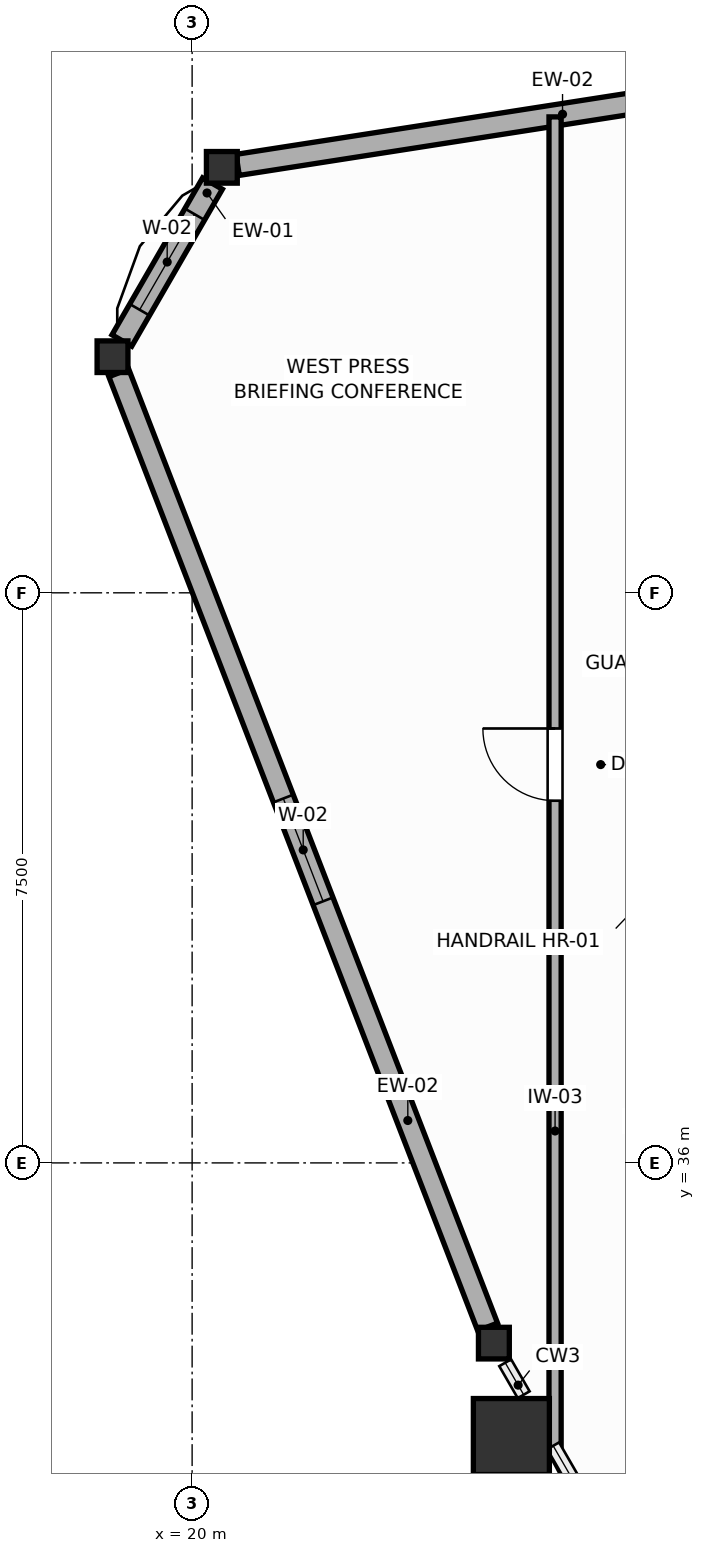
"""IFC4 building model, lengths in metres.
Left out: names, types, materials, properties, quantities, classifications, styles, units other than length and angle.
Written with IfcOpenShell. Run it as: python <this file> out.ifc"""

import sys

from ifc_helpers import new_model, si_unit, direction, frame, frame_2d, origin, origin_2d, place, context, subcontext, project, spatial, rectangle, i_section, extrude, source, transform, mapped, element, fill, save


model = new_model("IFC4")
c1 = context("Model", 3, precision=1e-05, world=origin(), true_north=direction((0.0, 1.0)))
c2 = subcontext(c1, "Body", "Model", "MODEL_VIEW")
j1 = project(units=[si_unit("LENGTHUNIT", "METRE"), si_unit("PLANEANGLEUNIT", "RADIAN")], contexts=[c1])
p1 = place(None, origin())
s1 = spatial("IfcSite", under=j1, at=p1, CompositionType="ELEMENT")
p2 = place(p1, origin())
s2 = spatial("IfcBuilding", under=s1, at=p2, CompositionType="ELEMENT")
p3 = place(p2, frame((0.0, 0.0, 234.6)))
s3 = spatial("IfcBuildingStorey", under=s2, at=p3, CompositionType="ELEMENT", Elevation=234.6)
m1 = source(origin(), c2, "Body", "SweptSolid", [
    extrude(rectangle(XDim=1.0, YDim=1.0, at=origin_2d()), origin(), (0.0, 0.0, 1.0), 3.6),
])
p4 = place(p3, frame((24.2, 32.4, 0.0), z_axis=(0.0, 0.0, 1.0), x_axis=(1.0, 0.0, 0.0)))
e1 = element("IfcColumn", 1, at=p4, inside=s3, PredefinedType="COLUMN", context=c2, shape_type="MappedRepresentation", body=[
    mapped(m1, transform((0.0, 0.0, 0.0), scale=1.0)),
])
m2 = source(origin(), c2, "Body", "SweptSolid", [
    extrude(i_section(OverallWidth=0.406, OverallDepth=0.416, WebThickness=0.027, FlangeThickness=0.044, FilletRadius=0.015, at=origin_2d()), origin(), (0.0, 0.0, 1.0), 3.6),
])
for number, where, z_axis, x_axis in (
    (2, (20.391, 49.098, 0.0), (0.0, 0.0, 1.0), (1.0, 0.0, 0.0)),
    (3, (18.953, 46.606, 0.0), (0.0, 0.0, 1.0), (1.0, 0.0, 0.0)),
    (4, (23.97, 33.629, 0.0), (0.0, 0.0, 1.0), (1.0, 0.0, 0.0)),
):
    element("IfcColumn", number, at=place(p3, frame(where, z_axis=z_axis, x_axis=x_axis)), inside=s3, PredefinedType="COLUMN", context=c2, shape_type="MappedRepresentation", body=[
        mapped(m2, transform((0.0, 0.0, 0.0), scale=1.0)),
    ])
p5 = place(p3, frame((33.93, 51.209, 0.0), z_axis=(0.0, 0.0, 1.0), x_axis=(-0.988058563106, -0.154078797613, 0.0)))
e5 = element("IfcWall", 5, at=p5, inside=s3, PredefinedType="SOLIDWALL", context=c2, shape_type="SweptSolid", body=[
    extrude(rectangle(XDim=13.492, YDim=0.28, at=frame_2d((6.746, 0.0))), origin(), (0.0, 0.0, 1.0), 2.81),
])
p6 = place(p5, frame((3.211, 0.0, 0.75)))
e6 = element("IfcOpeningElement", 6, at=p6, cuts=e5, PredefinedType="OPENING", context=c2, shape_type="SweptSolid", body=[
    extrude(rectangle(XDim=1.45, YDim=1.65, at=frame_2d((0.725, 0.825))), frame((0.0, 0.15, 0.0), z_axis=(0.0, -1.0, 0.0), x_axis=(1.0, 0.0, 0.0)), (0.0, 0.0, 1.0), 0.3),
])
p7 = place(p3, frame((20.268, 48.885, 0.0), z_axis=(0.0, 0.0, 1.0), x_axis=(-0.500014901547, -0.866016800201, 0.0)))
e7 = element("IfcWall", 7, at=p7, inside=s3, PredefinedType="SOLIDWALL", context=c2, shape_type="SweptSolid", body=[
    extrude(rectangle(XDim=2.385, YDim=0.3, at=frame_2d((1.192, 0.0))), origin(), (0.0, 0.0, 1.0), 2.87),
])
p8 = place(p7, frame((0.467, 0.0, 0.75)))
e8 = element("IfcOpeningElement", 8, at=p8, cuts=e7, PredefinedType="OPENING", context=c2, shape_type="SweptSolid", body=[
    extrude(rectangle(XDim=1.45, YDim=1.65, at=frame_2d((0.725, 0.825))), frame((0.0, 0.16, 0.0), z_axis=(0.0, -1.0, 0.0), x_axis=(1.0, 0.0, 0.0)), (0.0, 0.0, 1.0), 0.32),
])
p9 = place(p3, frame((19.035, 46.393, 0.0), z_axis=(0.0, 0.0, 1.0), x_axis=(0.360620992305, -0.93271244224, 0.0)))
e9 = element("IfcWall", 9, at=p9, inside=s3, PredefinedType="SOLIDWALL", context=c2, shape_type="SweptSolid", body=[
    extrude(rectangle(XDim=13.457, YDim=0.28, at=frame_2d((6.729, 0.0))), origin(), (0.0, 0.0, 1.0), 2.87),
])
p10 = place(p9, frame((6.003, 0.0, 0.75)))
e10 = element("IfcOpeningElement", 10, at=p10, cuts=e9, PredefinedType="OPENING", context=c2, shape_type="SweptSolid", body=[
    extrude(rectangle(XDim=1.45, YDim=1.65, at=frame_2d((0.725, 0.825))), frame((0.0, 0.15, 0.0), z_axis=(0.0, -1.0, 0.0), x_axis=(1.0, 0.0, 0.0)), (0.0, 0.0, 1.0), 0.3),
])
p11 = place(p3, frame((24.775, 32.255, 0.0), z_axis=(0.0, 0.0, 1.0), x_axis=(0.0, 1.0, 0.0)))
e11 = element("IfcWall", 11, at=p11, inside=s3, PredefinedType="PARTITIONING", context=c2, shape_type="SweptSolid", body=[
    extrude(rectangle(XDim=17.507, YDim=0.16, at=frame_2d((8.753, 0.0))), origin(), (0.0, 0.0, 1.0), 3.26),
])
p12 = place(p11, frame((8.51, 0.0, 0.0)))
e12 = element("IfcOpeningElement", 12, at=p12, cuts=e11, PredefinedType="OPENING", context=c2, shape_type="SweptSolid", body=[
    extrude(rectangle(XDim=0.95, YDim=2.05, at=frame_2d((0.475, 1.025))), frame((0.0, 0.09, 0.0), z_axis=(0.0, -1.0, 0.0), x_axis=(1.0, 0.0, 0.0)), (0.0, 0.0, 1.0), 0.18),
])
p13 = place(p8, origin())
e13 = element("IfcWindow", 13, at=p13, inside=s3, PartitioningType="SINGLE_PANEL", PredefinedType="WINDOW", context=c2, shape_type="SweptSolid", body=[
    extrude(rectangle(XDim=1.45, YDim=1.65, at=frame_2d((0.725, 0.825))), frame((0.0, 0.03, 0.0), z_axis=(0.0, -1.0, 0.0), x_axis=(1.0, 0.0, 0.0)), (0.0, 0.0, 1.0), 0.06),
])
fill(e8, e13)
p14 = place(p10, origin())
e14 = element("IfcWindow", 14, at=p14, inside=s3, PartitioningType="SINGLE_PANEL", PredefinedType="WINDOW", context=c2, shape_type="SweptSolid", body=[
    extrude(rectangle(XDim=1.45, YDim=1.65, at=frame_2d((0.725, 0.825))), frame((0.0, 0.03, 0.0), z_axis=(0.0, -1.0, 0.0), x_axis=(1.0, 0.0, 0.0)), (0.0, 0.0, 1.0), 0.06),
])
fill(e10, e14)
p15 = place(p12, origin())
e15 = element("IfcDoor", 15, at=p15, inside=s3, OperationType="SINGLE_SWING_RIGHT", PredefinedType="DOOR", context=c2, shape_type="SweptSolid", body=[
    extrude(rectangle(XDim=0.95, YDim=2.05, at=frame_2d((0.475, 1.025))), frame((0.0, 0.025, 0.0), z_axis=(0.0, -1.0, 0.0), x_axis=(1.0, 0.0, 0.0)), (0.0, 0.0, 1.0), 0.05),
])
fill(e12, e15)
save(model, sys.argv[1])
